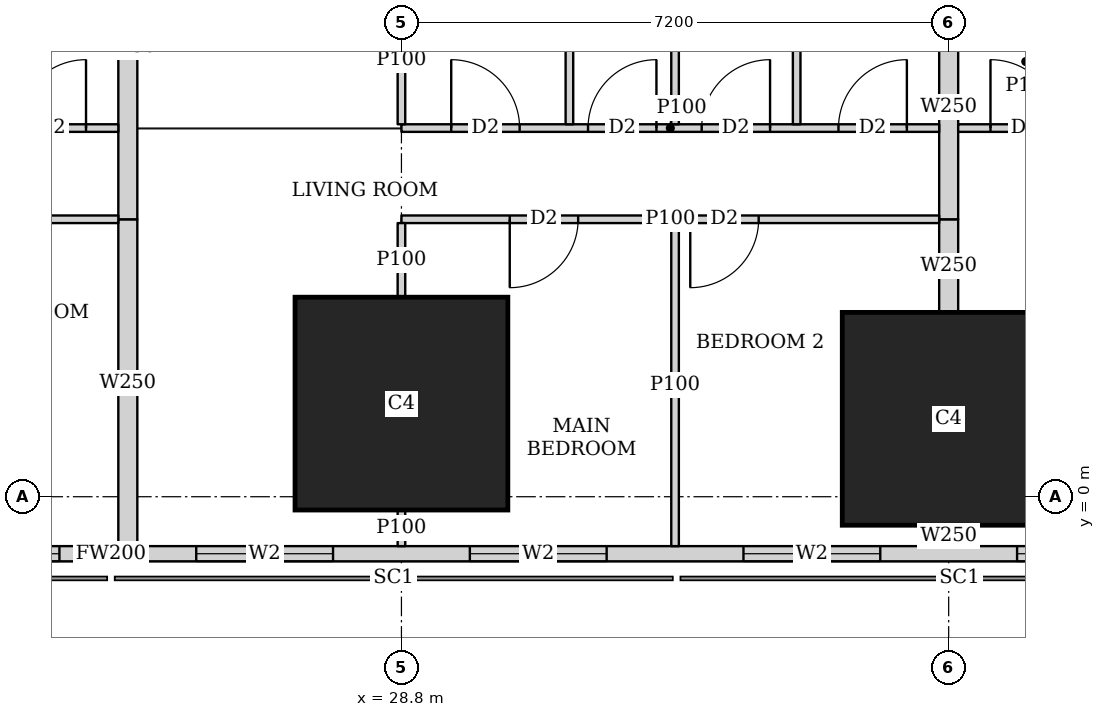
"""IFC4 building model, lengths in metres.
Left out: names, types, materials, properties, quantities, classifications, styles, units other than length and angle.
Written with IfcOpenShell. Run it as: python <this file> out.ifc"""

import sys

from ifc_helpers import new_model, si_unit, direction, frame, frame_2d, origin, origin_2d, place, context, subcontext, project, spatial, rectangle, extrude, element, fill, save


model = new_model("IFC4")
c1 = context("Model", 3, precision=1e-05, world=origin(), true_north=direction((0.0, 1.0)))
c2 = subcontext(c1, "Body", "Model", "MODEL_VIEW")
j1 = project(units=[si_unit("LENGTHUNIT", "METRE"), si_unit("PLANEANGLEUNIT", "RADIAN")], contexts=[c1])
p1 = place(None, origin())
s1 = spatial("IfcSite", under=j1, at=p1, CompositionType="ELEMENT")
p2 = place(p1, origin())
s2 = spatial("IfcBuilding", under=s1, at=p2, CompositionType="ELEMENT")
p3 = place(p2, frame((0.0, 0.0, 31.25)))
s3 = spatial("IfcBuildingStorey", under=s2, at=p3, CompositionType="ELEMENT", Elevation=31.25)
for number, where, z_axis, x_axis in (
    (1, (28.8, 1.225, 0.0), (0.0, 0.0, 1.0), (1.0, 0.0, 0.0)),
    (2, (36.0, 1.025, 0.0), (0.0, 0.0, 1.0), (1.0, 0.0, 0.0)),
):
    element("IfcColumn", number, at=place(p3, frame(where, z_axis=z_axis, x_axis=x_axis)), inside=s3, PredefinedType="COLUMN", context=c2, shape_type="SweptSolid", body=[
        extrude(rectangle(XDim=2.8, YDim=2.8, at=origin_2d()), origin(), (0.0, 0.0, 1.0), 3.75),
    ])
p4 = place(p3, frame((2.163, -0.75, 0.0), z_axis=(0.0, 0.0, 1.0), x_axis=(1.0, 0.0, 0.0)))
e3 = element("IfcWall", 3, at=p4, inside=s3, PredefinedType="SOLIDWALL", context=c2, shape_type="SweptSolid", body=[
    extrude(rectangle(XDim=45.628, YDim=0.2, at=frame_2d((22.814, 0.0))), origin(), (0.0, 0.0, 1.0), 3.5),
])
p5 = place(p4, frame((9.537, 0.0, 0.9)))
e4 = element("IfcOpeningElement", 4, at=p5, cuts=e3, PredefinedType="OPENING", context=c2, shape_type="SweptSolid", body=[
    extrude(rectangle(XDim=1.8, YDim=1.5, at=frame_2d((0.9, 0.75))), frame((0.0, 0.11, 0.0), z_axis=(0.0, -1.0, 0.0), x_axis=(1.0, 0.0, 0.0)), (0.0, 0.0, 1.0), 0.22),
])
p6 = place(p4, frame((13.137, 0.0, 0.9)))
e5 = element("IfcOpeningElement", 5, at=p6, cuts=e3, PredefinedType="OPENING", context=c2, shape_type="SweptSolid", body=[
    extrude(rectangle(XDim=1.8, YDim=1.5, at=frame_2d((0.9, 0.75))), frame((0.0, 0.11, 0.0), z_axis=(0.0, -1.0, 0.0), x_axis=(1.0, 0.0, 0.0)), (0.0, 0.0, 1.0), 0.22),
])
p7 = place(p4, frame((16.737, 0.0, 0.9)))
e6 = element("IfcOpeningElement", 6, at=p7, cuts=e3, PredefinedType="OPENING", context=c2, shape_type="SweptSolid", body=[
    extrude(rectangle(XDim=1.8, YDim=1.5, at=frame_2d((0.9, 0.75))), frame((0.0, 0.11, 0.0), z_axis=(0.0, -1.0, 0.0), x_axis=(1.0, 0.0, 0.0)), (0.0, 0.0, 1.0), 0.22),
])
p8 = place(p4, frame((20.337, 0.0, 0.9)))
e7 = element("IfcOpeningElement", 7, at=p8, cuts=e3, PredefinedType="OPENING", context=c2, shape_type="SweptSolid", body=[
    extrude(rectangle(XDim=1.8, YDim=1.5, at=frame_2d((0.9, 0.75))), frame((0.0, 0.11, 0.0), z_axis=(0.0, -1.0, 0.0), x_axis=(1.0, 0.0, 0.0)), (0.0, 0.0, 1.0), 0.22),
])
p9 = place(p4, frame((23.937, 0.0, 0.9)))
e8 = element("IfcOpeningElement", 8, at=p9, cuts=e3, PredefinedType="OPENING", context=c2, shape_type="SweptSolid", body=[
    extrude(rectangle(XDim=1.8, YDim=1.5, at=frame_2d((0.9, 0.75))), frame((0.0, 0.11, 0.0), z_axis=(0.0, -1.0, 0.0), x_axis=(1.0, 0.0, 0.0)), (0.0, 0.0, 1.0), 0.22),
])
p10 = place(p4, frame((27.537, 0.0, 0.9)))
e9 = element("IfcOpeningElement", 9, at=p10, cuts=e3, PredefinedType="OPENING", context=c2, shape_type="SweptSolid", body=[
    extrude(rectangle(XDim=1.8, YDim=1.5, at=frame_2d((0.9, 0.75))), frame((0.0, 0.11, 0.0), z_axis=(0.0, -1.0, 0.0), x_axis=(1.0, 0.0, 0.0)), (0.0, 0.0, 1.0), 0.22),
])
p11 = place(p4, frame((31.137, 0.0, 0.9)))
e10 = element("IfcOpeningElement", 10, at=p11, cuts=e3, PredefinedType="OPENING", context=c2, shape_type="SweptSolid", body=[
    extrude(rectangle(XDim=1.8, YDim=1.5, at=frame_2d((0.9, 0.75))), frame((0.0, 0.11, 0.0), z_axis=(0.0, -1.0, 0.0), x_axis=(1.0, 0.0, 0.0)), (0.0, 0.0, 1.0), 0.22),
])
p12 = place(p4, frame((34.737, 0.0, 0.9)))
e11 = element("IfcOpeningElement", 11, at=p12, cuts=e3, PredefinedType="OPENING", context=c2, shape_type="SweptSolid", body=[
    extrude(rectangle(XDim=1.8, YDim=1.5, at=frame_2d((0.9, 0.75))), frame((0.0, 0.11, 0.0), z_axis=(0.0, -1.0, 0.0), x_axis=(1.0, 0.0, 0.0)), (0.0, 0.0, 1.0), 0.22),
])
p13 = place(p3, frame((35.094, 36.585, 0.0), z_axis=(0.0, 0.0, 1.0), x_axis=(0.185588860311, -0.982627485331, 0.0)))
e12 = element("IfcWall", 12, at=p13, inside=s3, PredefinedType="SOLIDWALL", context=c2, shape_type="SweptSolid", body=[
    extrude(rectangle(XDim=34.797, YDim=0.15, at=frame_2d((17.399, 0.0))), origin(), (0.0, 0.0, 1.0), 2.5),
])
p14 = place(p13, frame((6.012, 0.0, 0.0)))
e13 = element("IfcOpeningElement", 13, at=p14, cuts=e12, PredefinedType="OPENING", context=c2, shape_type="SweptSolid", body=[
    extrude(rectangle(XDim=1.0, YDim=2.1, at=frame_2d((0.5, 1.05))), frame((0.0, 0.085, 0.0), z_axis=(0.0, -1.0, 0.0), x_axis=(1.0, 0.0, 0.0)), (0.0, 0.0, 1.0), 0.17),
])
p15 = place(p13, frame((9.828, 0.0, 0.0)))
e14 = element("IfcOpeningElement", 14, at=p15, cuts=e12, PredefinedType="OPENING", context=c2, shape_type="SweptSolid", body=[
    extrude(rectangle(XDim=1.0, YDim=2.1, at=frame_2d((0.5, 1.05))), frame((0.0, 0.085, 0.0), z_axis=(0.0, -1.0, 0.0), x_axis=(1.0, 0.0, 0.0)), (0.0, 0.0, 1.0), 0.17),
])
p16 = place(p13, frame((25.9, 0.0, 0.0)))
e15 = element("IfcOpeningElement", 15, at=p16, cuts=e12, PredefinedType="OPENING", context=c2, shape_type="SweptSolid", body=[
    extrude(rectangle(XDim=1.0, YDim=2.1, at=frame_2d((0.5, 1.05))), frame((0.0, 0.085, 0.0), z_axis=(0.0, -1.0, 0.0), x_axis=(1.0, 0.0, 0.0)), (0.0, 0.0, 1.0), 0.17),
])
p17 = place(p3, frame((25.075, 3.65, 0.0), z_axis=(0.0, 0.0, 1.0), x_axis=(-1.0, 0.0, 0.0)))
e16 = element("IfcWall", 16, at=p17, inside=s3, PredefinedType="PARTITIONING", context=c2, shape_type="SweptSolid", body=[
    extrude(rectangle(XDim=7.075, YDim=0.1, at=frame_2d((3.538, 0.0))), origin(), (0.0, 0.0, 1.0), 3.5),
])
p18 = place(p17, frame((5.975, 0.0, 0.0)))
e17 = element("IfcOpeningElement", 17, at=p18, cuts=e16, PredefinedType="OPENING", context=c2, shape_type="SweptSolid", body=[
    extrude(rectangle(XDim=0.9, YDim=2.1, at=frame_2d((0.45, 1.05))), frame((0.0, 0.06, 0.0), z_axis=(0.0, -1.0, 0.0), x_axis=(1.0, 0.0, 0.0)), (0.0, 0.0, 1.0), 0.12),
])
p19 = place(p17, frame((1.15, 0.0, 0.0)))
e18 = element("IfcOpeningElement", 18, at=p19, cuts=e16, PredefinedType="OPENING", context=c2, shape_type="SweptSolid", body=[
    extrude(rectangle(XDim=0.9, YDim=2.1, at=frame_2d((0.45, 1.05))), frame((0.0, 0.06, 0.0), z_axis=(0.0, -1.0, 0.0), x_axis=(1.0, 0.0, 0.0)), (0.0, 0.0, 1.0), 0.12),
])
p20 = place(p3, frame((25.075, 4.85, 0.0), z_axis=(0.0, 0.0, 1.0), x_axis=(-1.0, 0.0, 0.0)))
e19 = element("IfcWall", 19, at=p20, inside=s3, PredefinedType="PARTITIONING", context=c2, shape_type="SweptSolid", body=[
    extrude(rectangle(XDim=7.075, YDim=0.1, at=frame_2d((3.538, 0.0))), origin(), (0.0, 0.0, 1.0), 3.5),
])
p21 = place(p20, frame((5.52, 0.0, 0.0)))
e20 = element("IfcOpeningElement", 20, at=p21, cuts=e19, PredefinedType="OPENING", context=c2, shape_type="SweptSolid", body=[
    extrude(rectangle(XDim=0.9, YDim=2.1, at=frame_2d((0.45, 1.05))), frame((0.0, 0.06, 0.0), z_axis=(0.0, -1.0, 0.0), x_axis=(1.0, 0.0, 0.0)), (0.0, 0.0, 1.0), 0.12),
])
p22 = place(p20, frame((2.225, 0.0, 0.0)))
e21 = element("IfcOpeningElement", 21, at=p22, cuts=e19, PredefinedType="OPENING", context=c2, shape_type="SweptSolid", body=[
    extrude(rectangle(XDim=0.9, YDim=2.1, at=frame_2d((0.45, 1.05))), frame((0.0, 0.06, 0.0), z_axis=(0.0, -1.0, 0.0), x_axis=(1.0, 0.0, 0.0)), (0.0, 0.0, 1.0), 0.12),
])
p23 = place(p20, frame((3.72, 0.0, 0.0)))
e22 = element("IfcOpeningElement", 22, at=p23, cuts=e19, PredefinedType="OPENING", context=c2, shape_type="SweptSolid", body=[
    extrude(rectangle(XDim=0.9, YDim=2.1, at=frame_2d((0.45, 1.05))), frame((0.0, 0.06, 0.0), z_axis=(0.0, -1.0, 0.0), x_axis=(1.0, 0.0, 0.0)), (0.0, 0.0, 1.0), 0.12),
])
p24 = place(p20, frame((0.425, 0.0, 0.0)))
e23 = element("IfcOpeningElement", 23, at=p24, cuts=e19, PredefinedType="OPENING", context=c2, shape_type="SweptSolid", body=[
    extrude(rectangle(XDim=0.9, YDim=2.1, at=frame_2d((0.45, 1.05))), frame((0.0, 0.06, 0.0), z_axis=(0.0, -1.0, 0.0), x_axis=(1.0, 0.0, 0.0)), (0.0, 0.0, 1.0), 0.12),
])
p25 = place(p3, frame((35.875, 3.65, 0.0), z_axis=(0.0, 0.0, 1.0), x_axis=(-1.0, 0.0, 0.0)))
e24 = element("IfcWall", 24, at=p25, inside=s3, PredefinedType="PARTITIONING", context=c2, shape_type="SweptSolid", body=[
    extrude(rectangle(XDim=7.075, YDim=0.1, at=frame_2d((3.538, 0.0))), origin(), (0.0, 0.0, 1.0), 3.5),
])
p26 = place(p25, frame((4.75, 0.0, 0.0)))
e25 = element("IfcOpeningElement", 25, at=p26, cuts=e24, PredefinedType="OPENING", context=c2, shape_type="SweptSolid", body=[
    extrude(rectangle(XDim=0.9, YDim=2.1, at=frame_2d((0.45, 1.05))), frame((0.0, 0.06, 0.0), z_axis=(0.0, -1.0, 0.0), x_axis=(1.0, 0.0, 0.0)), (0.0, 0.0, 1.0), 0.12),
])
p27 = place(p25, frame((2.375, 0.0, 0.0)))
e26 = element("IfcOpeningElement", 26, at=p27, cuts=e24, PredefinedType="OPENING", context=c2, shape_type="SweptSolid", body=[
    extrude(rectangle(XDim=0.9, YDim=2.1, at=frame_2d((0.45, 1.05))), frame((0.0, 0.06, 0.0), z_axis=(0.0, -1.0, 0.0), x_axis=(1.0, 0.0, 0.0)), (0.0, 0.0, 1.0), 0.12),
])
p28 = place(p3, frame((35.875, 4.85, 0.0), z_axis=(0.0, 0.0, 1.0), x_axis=(-1.0, 0.0, 0.0)))
e27 = element("IfcWall", 27, at=p28, inside=s3, PredefinedType="PARTITIONING", context=c2, shape_type="SweptSolid", body=[
    extrude(rectangle(XDim=7.075, YDim=0.1, at=frame_2d((3.538, 0.0))), origin(), (0.0, 0.0, 1.0), 3.5),
])
p29 = place(p28, frame((5.52, 0.0, 0.0)))
e28 = element("IfcOpeningElement", 28, at=p29, cuts=e27, PredefinedType="OPENING", context=c2, shape_type="SweptSolid", body=[
    extrude(rectangle(XDim=0.9, YDim=2.1, at=frame_2d((0.45, 1.05))), frame((0.0, 0.06, 0.0), z_axis=(0.0, -1.0, 0.0), x_axis=(1.0, 0.0, 0.0)), (0.0, 0.0, 1.0), 0.12),
])
p30 = place(p28, frame((2.225, 0.0, 0.0)))
e29 = element("IfcOpeningElement", 29, at=p30, cuts=e27, PredefinedType="OPENING", context=c2, shape_type="SweptSolid", body=[
    extrude(rectangle(XDim=0.9, YDim=2.1, at=frame_2d((0.45, 1.05))), frame((0.0, 0.06, 0.0), z_axis=(0.0, -1.0, 0.0), x_axis=(1.0, 0.0, 0.0)), (0.0, 0.0, 1.0), 0.12),
])
p31 = place(p28, frame((3.72, 0.0, 0.0)))
e30 = element("IfcOpeningElement", 30, at=p31, cuts=e27, PredefinedType="OPENING", context=c2, shape_type="SweptSolid", body=[
    extrude(rectangle(XDim=0.9, YDim=2.1, at=frame_2d((0.45, 1.05))), frame((0.0, 0.06, 0.0), z_axis=(0.0, -1.0, 0.0), x_axis=(1.0, 0.0, 0.0)), (0.0, 0.0, 1.0), 0.12),
])
p32 = place(p28, frame((0.425, 0.0, 0.0)))
e31 = element("IfcOpeningElement", 31, at=p32, cuts=e27, PredefinedType="OPENING", context=c2, shape_type="SweptSolid", body=[
    extrude(rectangle(XDim=0.9, YDim=2.1, at=frame_2d((0.45, 1.05))), frame((0.0, 0.06, 0.0), z_axis=(0.0, -1.0, 0.0), x_axis=(1.0, 0.0, 0.0)), (0.0, 0.0, 1.0), 0.12),
])
p33 = place(p3, frame((28.8, -0.65, 0.0), z_axis=(0.0, 0.0, 1.0), x_axis=(0.0, 1.0, 0.0)))
e32 = element("IfcWall", 32, at=p33, inside=s3, PredefinedType="PARTITIONING", context=c2, shape_type="SweptSolid", body=[
    extrude(rectangle(XDim=0.474, YDim=0.1, at=frame_2d((0.237, 0.0))), origin(), (0.0, 0.0, 1.0), 3.5),
])
p34 = place(p3, frame((28.8, 2.626, 0.0), z_axis=(0.0, 0.0, 1.0), x_axis=(0.0, 1.0, 0.0)))
e33 = element("IfcWall", 33, at=p34, inside=s3, PredefinedType="PARTITIONING", context=c2, shape_type="SweptSolid", body=[
    extrude(rectangle(XDim=0.974, YDim=0.1, at=frame_2d((0.487, 0.0))), origin(), (0.0, 0.0, 1.0), 3.5),
])
p35 = place(p3, frame((32.4, -0.65, 0.0), z_axis=(0.0, 0.0, 1.0), x_axis=(0.0, 1.0, 0.0)))
e34 = element("IfcWall", 34, at=p35, inside=s3, PredefinedType="PARTITIONING", context=c2, shape_type="SweptSolid", body=[
    extrude(rectangle(XDim=4.25, YDim=0.1, at=frame_2d((2.125, 0.0))), origin(), (0.0, 0.0, 1.0), 2.05),
])
p36 = place(p3, frame((28.8, 4.9, 0.0), z_axis=(0.0, 0.0, 1.0), x_axis=(0.0, 1.0, 0.0)))
e35 = element("IfcWall", 35, at=p36, inside=s3, PredefinedType="PARTITIONING", context=c2, shape_type="SweptSolid", body=[
    extrude(rectangle(XDim=1.699, YDim=0.1, at=frame_2d((0.85, 0.0))), origin(), (0.0, 0.0, 1.0), 3.5),
])
for number, where, z_axis, x_axis in (
    (36, (32.4, 4.9, 0.0), (0.0, 0.0, 1.0), (0.0, 1.0, 0.0)),
    (37, (31.01, 4.9, 0.0), (0.0, 0.0, 1.0), (0.0, 1.0, 0.0)),
    (38, (34.0, 4.9, 0.0), (0.0, 0.0, 1.0), (0.0, 1.0, 0.0)),
):
    element("IfcWall", number, at=place(p3, frame(where, z_axis=z_axis, x_axis=x_axis)), inside=s3, PredefinedType="PARTITIONING", context=c2, shape_type="SweptSolid", body=[
        extrude(rectangle(XDim=3.275, YDim=0.1, at=frame_2d((1.638, 0.0))), origin(), (0.0, 0.0, 1.0), 3.5),
    ])
p37 = place(p3, frame((25.2, -0.65, 0.0), z_axis=(0.0, 0.0, 1.0), x_axis=(0.0, 1.0, 0.0)))
e39 = element("IfcWall", 39, at=p37, inside=s3, PredefinedType="SOLIDWALL", context=c2, shape_type="SweptSolid", body=[
    extrude(rectangle(XDim=4.3, YDim=0.25, at=frame_2d((2.15, 0.0))), origin(), (0.0, 0.0, 1.0), 2.05),
])
p38 = place(p3, frame((25.2, 3.65, 0.0), z_axis=(0.0, 0.0, 1.0), x_axis=(0.0, 1.0, 0.0)))
e40 = element("IfcWall", 40, at=p38, inside=s3, PredefinedType="SOLIDWALL", context=c2, shape_type="SweptSolid", body=[
    extrude(rectangle(XDim=4.525, YDim=0.25, at=frame_2d((2.263, 0.0))), origin(), (0.0, 0.0, 1.0), 3.5),
])
p39 = place(p3, frame((38.029, 4.85, 0.0), z_axis=(0.0, 0.0, 1.0), x_axis=(-1.0, 0.0, 0.0)))
e41 = element("IfcWall", 41, at=p39, inside=s3, PredefinedType="PARTITIONING", context=c2, shape_type="SweptSolid", body=[
    extrude(rectangle(XDim=1.904, YDim=0.1, at=frame_2d((0.952, 0.0))), origin(), (0.0, 0.0, 1.0), 3.5),
])
p40 = place(p39, frame((0.579, 0.0, 0.0)))
e42 = element("IfcOpeningElement", 42, at=p40, cuts=e41, PredefinedType="OPENING", context=c2, shape_type="SweptSolid", body=[
    extrude(rectangle(XDim=0.9, YDim=2.1, at=frame_2d((0.45, 1.05))), frame((0.0, 0.06, 0.0), z_axis=(0.0, -1.0, 0.0), x_axis=(1.0, 0.0, 0.0)), (0.0, 0.0, 1.0), 0.12),
])
p41 = place(p3, frame((36.0, -0.65, 0.0), z_axis=(0.0, 0.0, 1.0), x_axis=(0.0, 1.0, 0.0)))
e43 = element("IfcWall", 43, at=p41, inside=s3, PredefinedType="SOLIDWALL", context=c2, shape_type="SweptSolid", body=[
    extrude(rectangle(XDim=0.274, YDim=0.25, at=frame_2d((0.137, 0.0))), origin(), (0.0, 0.0, 1.0), 3.5),
])
p42 = place(p3, frame((36.0, 2.426, 0.0), z_axis=(0.0, 0.0, 1.0), x_axis=(0.0, 1.0, 0.0)))
e44 = element("IfcWall", 44, at=p42, inside=s3, PredefinedType="SOLIDWALL", context=c2, shape_type="SweptSolid", body=[
    extrude(rectangle(XDim=1.224, YDim=0.25, at=frame_2d((0.612, 0.0))), origin(), (0.0, 0.0, 1.0), 3.5),
])
p43 = place(p3, frame((36.0, 3.65, 0.0), z_axis=(0.0, 0.0, 1.0), x_axis=(0.0, 1.0, 0.0)))
e45 = element("IfcWall", 45, at=p43, inside=s3, PredefinedType="SOLIDWALL", context=c2, shape_type="SweptSolid", body=[
    extrude(rectangle(XDim=2.949, YDim=0.25, at=frame_2d((1.475, 0.0))), origin(), (0.0, 0.0, 1.0), 3.5),
])
p44 = place(p8, origin())
e46 = element("IfcWindow", 46, at=p44, inside=s3, PartitioningType="SINGLE_PANEL", PredefinedType="WINDOW", context=c2, shape_type="SweptSolid", body=[
    extrude(rectangle(XDim=1.8, YDim=1.5, at=frame_2d((0.9, 0.75))), frame((0.0, 0.03, 0.0), z_axis=(0.0, -1.0, 0.0), x_axis=(1.0, 0.0, 0.0)), (0.0, 0.0, 1.0), 0.06),
])
fill(e7, e46)
p45 = place(p9, origin())
e47 = element("IfcWindow", 47, at=p45, inside=s3, PartitioningType="SINGLE_PANEL", PredefinedType="WINDOW", context=c2, shape_type="SweptSolid", body=[
    extrude(rectangle(XDim=1.8, YDim=1.5, at=frame_2d((0.9, 0.75))), frame((0.0, 0.03, 0.0), z_axis=(0.0, -1.0, 0.0), x_axis=(1.0, 0.0, 0.0)), (0.0, 0.0, 1.0), 0.06),
])
fill(e8, e47)
p46 = place(p10, origin())
e48 = element("IfcWindow", 48, at=p46, inside=s3, PartitioningType="SINGLE_PANEL", PredefinedType="WINDOW", context=c2, shape_type="SweptSolid", body=[
    extrude(rectangle(XDim=1.8, YDim=1.5, at=frame_2d((0.9, 0.75))), frame((0.0, 0.03, 0.0), z_axis=(0.0, -1.0, 0.0), x_axis=(1.0, 0.0, 0.0)), (0.0, 0.0, 1.0), 0.06),
])
fill(e9, e48)
p47 = place(p11, origin())
e49 = element("IfcWindow", 49, at=p47, inside=s3, PartitioningType="SINGLE_PANEL", PredefinedType="WINDOW", context=c2, shape_type="SweptSolid", body=[
    extrude(rectangle(XDim=1.8, YDim=1.5, at=frame_2d((0.9, 0.75))), frame((0.0, 0.03, 0.0), z_axis=(0.0, -1.0, 0.0), x_axis=(1.0, 0.0, 0.0)), (0.0, 0.0, 1.0), 0.06),
])
fill(e10, e49)
p48 = place(p12, origin())
e50 = element("IfcWindow", 50, at=p48, inside=s3, PartitioningType="SINGLE_PANEL", PredefinedType="WINDOW", context=c2, shape_type="SweptSolid", body=[
    extrude(rectangle(XDim=1.8, YDim=1.5, at=frame_2d((0.9, 0.75))), frame((0.0, 0.03, 0.0), z_axis=(0.0, -1.0, 0.0), x_axis=(1.0, 0.0, 0.0)), (0.0, 0.0, 1.0), 0.06),
])
fill(e11, e50)
p49 = place(p24, origin())
e51 = element("IfcDoor", 51, at=p49, inside=s3, OperationType="SINGLE_SWING_RIGHT", PredefinedType="DOOR", context=c2, shape_type="SweptSolid", body=[
    extrude(rectangle(XDim=0.9, YDim=2.1, at=frame_2d((0.45, 1.05))), frame((0.0, 0.025, 0.0), z_axis=(0.0, -1.0, 0.0), x_axis=(1.0, 0.0, 0.0)), (0.0, 0.0, 1.0), 0.05),
])
fill(e23, e51)
p50 = place(p26, origin())
e52 = element("IfcDoor", 52, at=p50, inside=s3, OperationType="SINGLE_SWING_RIGHT", PredefinedType="DOOR", context=c2, shape_type="SweptSolid", body=[
    extrude(rectangle(XDim=0.9, YDim=2.1, at=frame_2d((0.45, 1.05))), frame((0.0, 0.025, 0.0), z_axis=(0.0, -1.0, 0.0), x_axis=(1.0, 0.0, 0.0)), (0.0, 0.0, 1.0), 0.05),
])
fill(e25, e52)
p51 = place(p27, origin())
e53 = element("IfcDoor", 53, at=p51, inside=s3, OperationType="SINGLE_SWING_RIGHT", PredefinedType="DOOR", context=c2, shape_type="SweptSolid", body=[
    extrude(rectangle(XDim=0.9, YDim=2.1, at=frame_2d((0.45, 1.05))), frame((0.0, 0.025, 0.0), z_axis=(0.0, -1.0, 0.0), x_axis=(1.0, 0.0, 0.0)), (0.0, 0.0, 1.0), 0.05),
])
fill(e26, e53)
p52 = place(p29, origin())
e54 = element("IfcDoor", 54, at=p52, inside=s3, OperationType="SINGLE_SWING_LEFT", PredefinedType="DOOR", context=c2, shape_type="SweptSolid", body=[
    extrude(rectangle(XDim=0.9, YDim=2.1, at=frame_2d((0.45, 1.05))), frame((0.0, 0.025, 0.0), z_axis=(0.0, -1.0, 0.0), x_axis=(1.0, 0.0, 0.0)), (0.0, 0.0, 1.0), 0.05),
])
fill(e28, e54)
p53 = place(p30, origin())
e55 = element("IfcDoor", 55, at=p53, inside=s3, OperationType="SINGLE_SWING_RIGHT", PredefinedType="DOOR", context=c2, shape_type="SweptSolid", body=[
    extrude(rectangle(XDim=0.9, YDim=2.1, at=frame_2d((0.45, 1.05))), frame((0.0, 0.025, 0.0), z_axis=(0.0, -1.0, 0.0), x_axis=(1.0, 0.0, 0.0)), (0.0, 0.0, 1.0), 0.05),
])
fill(e29, e55)
p54 = place(p31, origin())
e56 = element("IfcDoor", 56, at=p54, inside=s3, OperationType="SINGLE_SWING_RIGHT", PredefinedType="DOOR", context=c2, shape_type="SweptSolid", body=[
    extrude(rectangle(XDim=0.9, YDim=2.1, at=frame_2d((0.45, 1.05))), frame((0.0, 0.025, 0.0), z_axis=(0.0, -1.0, 0.0), x_axis=(1.0, 0.0, 0.0)), (0.0, 0.0, 1.0), 0.05),
])
fill(e30, e56)
p55 = place(p32, origin())
e57 = element("IfcDoor", 57, at=p55, inside=s3, OperationType="SINGLE_SWING_RIGHT", PredefinedType="DOOR", context=c2, shape_type="SweptSolid", body=[
    extrude(rectangle(XDim=0.9, YDim=2.1, at=frame_2d((0.45, 1.05))), frame((0.0, 0.025, 0.0), z_axis=(0.0, -1.0, 0.0), x_axis=(1.0, 0.0, 0.0)), (0.0, 0.0, 1.0), 0.05),
])
fill(e31, e57)
p56 = place(p40, origin())
e58 = element("IfcDoor", 58, at=p56, inside=s3, OperationType="SINGLE_SWING_LEFT", PredefinedType="DOOR", context=c2, shape_type="SweptSolid", body=[
    extrude(rectangle(XDim=0.9, YDim=2.1, at=frame_2d((0.45, 1.05))), frame((0.0, 0.025, 0.0), z_axis=(0.0, -1.0, 0.0), x_axis=(1.0, 0.0, 0.0)), (0.0, 0.0, 1.0), 0.05),
])
fill(e42, e58)
save(model, sys.argv[1])
